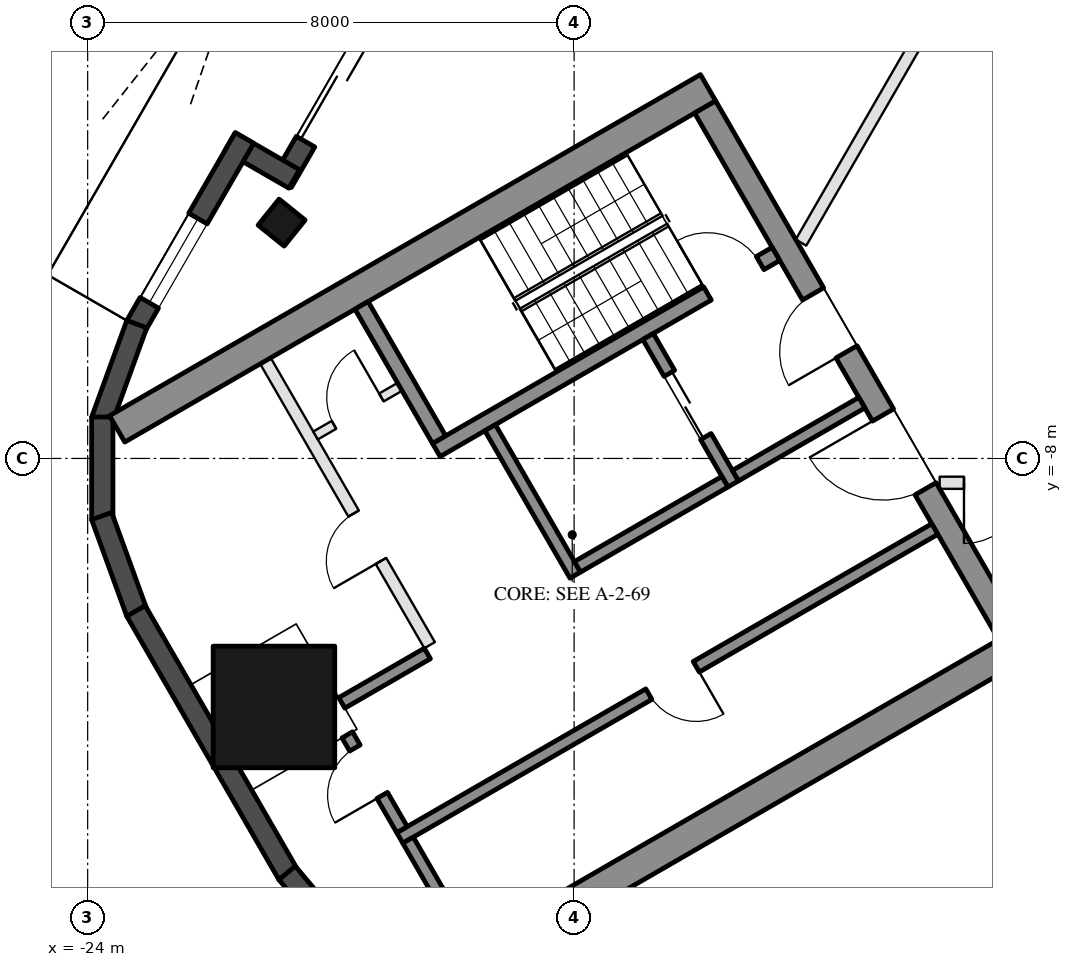
"""IFC4 building model, lengths in metres.
Left out: names, types, materials, properties, quantities, classifications, styles, units other than length and angle.
Written with IfcOpenShell. Run it as: python <this file> out.ifc"""

import sys

from ifc_helpers import new_model, si_unit, direction, frame, frame_2d, origin, origin_2d, place, context, subcontext, project, spatial, rectangle, hollow_rectangle, extrude, boolean, halfspace, element, fill, save


model = new_model("IFC4")
c1 = context("Model", 3, precision=1e-05, world=origin(), true_north=direction((0.0, 1.0)))
c2 = subcontext(c1, "Body", "Model", "MODEL_VIEW")
j1 = project(units=[si_unit("LENGTHUNIT", "METRE"), si_unit("PLANEANGLEUNIT", "RADIAN")], contexts=[c1])
p1 = place(None, origin())
s1 = spatial("IfcSite", under=j1, at=p1, CompositionType="ELEMENT")
p2 = place(p1, origin())
s2 = spatial("IfcBuilding", under=s1, at=p2, CompositionType="ELEMENT")
p3 = place(p2, frame((0.0, 0.0, 298.5)))
s3 = spatial("IfcBuildingStorey", under=s2, at=p3, CompositionType="ELEMENT", Elevation=298.5)
p4 = place(p3, frame((-20.81, -4.121, 0.0), z_axis=(0.190735837279, 0.02958801006, 0.981195388309), x_axis=(-0.488489055842, -0.864137452388, 0.121016138189)))
e1 = element("IfcColumn", 1, at=p4, inside=s3, PredefinedType="COLUMN", context=c2, shape_type="SweptSolid", body=[
    boolean("DIFFERENCE", boolean("DIFFERENCE", extrude(hollow_rectangle(XDim=0.55, YDim=0.55, WallThickness=0.025, at=origin_2d()), origin(), (0.0, 0.0, 1.0), 3.771), halfspace(frame((0.0, 0.0, 0.04), z_axis=(0.0, 0.0, 1.0), x_axis=(1.0, 0.0, 0.0)), True)), halfspace(frame((0.0, 0.0, 3.731), z_axis=(0.0, 0.0, 1.0), x_axis=(1.0, 0.0, 0.0)), False)),
])
p5 = place(p3, frame((-20.936, -12.087, 0.0), z_axis=(0.190408197016, 0.109880592395, 0.975536249416), x_axis=(-0.499868084483, 0.866101551773, 1.1510724e-05)))
e2 = element("IfcColumn", 2, at=p5, inside=s3, PredefinedType="COLUMN", context=c2, shape_type="SweptSolid", body=[
    boolean("DIFFERENCE", boolean("DIFFERENCE", extrude(hollow_rectangle(XDim=2.0, YDim=2.0, WallThickness=0.05, at=origin_2d()), origin(), (0.0, 0.0, 1.0), 3.793), halfspace(frame((0.0, 0.0, 0.113), z_axis=(0.0, 0.0, 1.0), x_axis=(1.0, 0.0, 0.0)), True)), halfspace(frame((0.0, 0.0, 3.679), z_axis=(0.0, 0.0, 1.0), x_axis=(1.0, 0.0, 0.0)), False)),
])
p6 = place(p3, frame((-17.888, 1.59, 0.0), z_axis=(0.0, 0.0, 1.0), x_axis=(-0.499987198161, -0.866032794804, 0.0)))
e3 = element("IfcWall", 3, at=p6, inside=s3, PredefinedType="SOLIDWALL", context=c2, shape_type="SweptSolid", body=[
    extrude(rectangle(XDim=5.827, YDim=0.35, at=frame_2d((2.914, 0.0))), origin(), (0.0, 0.0, 1.0), 3.55),
])
p7 = place(p6, frame((2.657, 0.0, 0.0)))
e4 = element("IfcOpeningElement", 4, at=p7, cuts=e3, PredefinedType="OPENING", context=c2, shape_type="SweptSolid", body=[
    extrude(rectangle(XDim=2.4, YDim=2.4, at=frame_2d((1.2, 1.2))), frame((0.0, 0.185, 0.0), z_axis=(0.0, -1.0, 0.0), x_axis=(1.0, 0.0, 0.0)), (0.0, 0.0, 1.0), 0.37),
])
p8 = place(p6, frame((0.77, 0.0, 0.3)))
e5 = element("IfcOpeningElement", 5, at=p8, cuts=e3, PredefinedType="OPENING", context=c2, shape_type="SweptSolid", body=[
    extrude(rectangle(XDim=1.5, YDim=2.65, at=frame_2d((0.75, 1.325))), frame((0.0, 0.185, 0.0), z_axis=(0.0, -1.0, 0.0), x_axis=(1.0, 0.0, 0.0)), (0.0, 0.0, 1.0), 0.37),
])
p9 = place(p3, frame((-20.604, -3.403, 0.0), z_axis=(0.0, 0.0, 1.0), x_axis=(-0.866092288191, 0.499884134912, 0.0)))
e6 = element("IfcWall", 6, at=p9, inside=s3, PredefinedType="SOLIDWALL", context=c2, shape_type="SweptSolid", body=[
    extrude(rectangle(XDim=1.22, YDim=0.35, at=frame_2d((0.61, 0.0))), origin(), (0.0, 0.0, 1.0), 3.55),
])
p10 = place(p3, frame((-21.421, -2.729, 0.0), z_axis=(0.0, 0.0, 1.0), x_axis=(-0.500040399856, -0.86600207766, 0.0)))
e7 = element("IfcWall", 7, at=p10, inside=s3, PredefinedType="SOLIDWALL", context=c2, shape_type="SweptSolid", body=[
    extrude(rectangle(XDim=3.567, YDim=0.35, at=frame_2d((1.784, 0.0))), origin(), (0.0, 0.0, 1.0), 3.55),
])
p11 = place(p10, frame((1.53, 0.0, 0.3)))
e8 = element("IfcOpeningElement", 8, at=p11, cuts=e7, PredefinedType="OPENING", context=c2, shape_type="SweptSolid", body=[
    extrude(rectangle(XDim=1.6, YDim=2.65, at=frame_2d((0.8, 1.325))), frame((0.0, 0.185, 0.0), z_axis=(0.0, -1.0, 0.0), x_axis=(1.0, 0.0, 0.0)), (0.0, 0.0, 1.0), 0.37),
])
for number, where, z_axis, x_axis in (
    (9, (-23.192, -5.791, 0.0), (0.0, 0.0, 1.0), (-0.342, -0.94, 0.0)),
    (10, (-23.759, -7.319, 0.0), (0.0, 0.0, 1.0), (0.0, -1.0, 0.0)),
    (11, (-23.77, -8.948, 0.0), (0.0, 0.0, 1.0), (0.342, -0.94, 0.0)),
):
    element("IfcWall", number, at=place(p3, frame(where, z_axis=z_axis, x_axis=x_axis)), inside=s3, PredefinedType="SOLIDWALL", context=c2, shape_type="SweptSolid", body=[
        extrude(rectangle(XDim=1.689, YDim=0.35, at=frame_2d((0.845, 0.0))), origin(), (0.0, 0.0, 1.0), 3.55),
    ])
p12 = place(p3, frame((-23.205, -10.508, 0.0), z_axis=(0.0, 0.0, 1.0), x_axis=(0.500016662025, -0.866015783746, 0.0)))
e12 = element("IfcWall", 12, at=p12, inside=s3, PredefinedType="SOLIDWALL", context=c2, shape_type="SweptSolid", body=[
    extrude(rectangle(XDim=5.004, YDim=0.35, at=frame_2d((2.502, 0.0))), origin(), (0.0, 0.0, 1.0), 3.55),
])
p13 = place(p3, frame((-20.72, -14.817, 0.0), z_axis=(0.0, 0.0, 1.0), x_axis=(0.642697100627, -0.766120380127, 0.0)))
e13 = element("IfcWall", 13, at=p13, inside=s3, PredefinedType="SOLIDWALL", context=c2, shape_type="SweptSolid", body=[
    extrude(rectangle(XDim=1.689, YDim=0.35, at=frame_2d((0.845, 0.0))), origin(), (0.0, 0.0, 1.0), 3.55),
])
for number, where, z_axis, x_axis in (
    (14, (-13.797, -1.903, 0.0), (0.0, 0.0, 1.0), (-0.866, -0.5, 0.0)),
    (15, (-8.547, -10.997, 0.0), (0.0, 0.0, 1.0), (-0.866, -0.5, 0.0)),
):
    element("IfcWall", number, at=place(p3, frame(where, z_axis=z_axis, x_axis=x_axis)), inside=s3, PredefinedType="SHEAR", context=c2, shape_type="SweptSolid", body=[
        extrude(rectangle(XDim=11.222, YDim=0.5, at=frame_2d((5.611, 0.0))), origin(), (0.0, 0.0, 1.0), 3.5),
    ])
p14 = place(p3, frame((-13.845, -2.22, 0.0), z_axis=(0.0, 0.0, 1.0), x_axis=(0.500004234368, -0.866022959057, 0.0)))
e16 = element("IfcWall", 16, at=p14, inside=s3, PredefinedType="SHEAR", context=c2, shape_type="SweptSolid", body=[
    extrude(rectangle(XDim=10.0, YDim=0.4, at=frame_2d((5.0, 0.0))), origin(), (0.0, 0.0, 1.0), 3.5),
])
p15 = place(p14, frame((3.55, 0.0, 0.0)))
e17 = element("IfcOpeningElement", 17, at=p15, cuts=e16, PredefinedType="OPENING", context=c2, shape_type="SweptSolid", body=[
    extrude(rectangle(XDim=1.1, YDim=2.1, at=frame_2d((0.55, 1.05))), frame((0.0, 0.21, 0.0), z_axis=(0.0, -1.0, 0.0), x_axis=(1.0, 0.0, 0.0)), (0.0, 0.0, 1.0), 0.42),
])
p16 = place(p14, frame((5.85, 0.0, 0.0)))
e18 = element("IfcOpeningElement", 18, at=p16, cuts=e16, PredefinedType="OPENING", context=c2, shape_type="SweptSolid", body=[
    extrude(rectangle(XDim=1.4, YDim=2.1, at=frame_2d((0.7, 1.05))), frame((0.0, 0.21, 0.0), z_axis=(0.0, -1.0, 0.0), x_axis=(1.0, 0.0, 0.0)), (0.0, 0.0, 1.0), 0.42),
])
p17 = place(p3, frame((-12.681, -4.636, 0.0), z_axis=(0.0, 0.0, 1.0), x_axis=(-0.866021702275, -0.500006411147, 0.0)))
e19 = element("IfcWall", 19, at=p17, inside=s3, PredefinedType="SHEAR", context=c2, shape_type="SweptSolid", body=[
    extrude(rectangle(XDim=6.45, YDim=0.25, at=frame_2d((3.225, 0.0))), origin(), (0.0, 0.0, 1.0), 3.5),
])
p18 = place(p17, frame((0.3, 0.0, 0.0)))
e20 = element("IfcOpeningElement", 20, at=p18, cuts=e19, PredefinedType="OPENING", context=c2, shape_type="SweptSolid", body=[
    extrude(rectangle(XDim=1.0, YDim=2.1, at=frame_2d((0.5, 1.05))), frame((0.0, 0.135, 0.0), z_axis=(0.0, -1.0, 0.0), x_axis=(1.0, 0.0, 0.0)), (0.0, 0.0, 1.0), 0.27),
])
p19 = place(p3, frame((-19.496, -5.482, 0.0), z_axis=(0.0, 0.0, 1.0), x_axis=(0.499990435942, -0.866030925526, 0.0)))
e21 = element("IfcWall", 21, at=p19, inside=s3, PredefinedType="SHEAR", context=c2, shape_type="SweptSolid", body=[
    extrude(rectangle(XDim=2.55, YDim=0.25, at=frame_2d((1.275, 0.0))), origin(), (0.0, 0.0, 1.0), 3.5),
])
p20 = place(p3, frame((-17.381, -7.495, 0.0), z_axis=(0.0, 0.0, 1.0), x_axis=(0.500011755427, -0.866018616679, 0.0)))
e22 = element("IfcWall", 22, at=p20, inside=s3, PredefinedType="SHEAR", context=c2, shape_type="SweptSolid", body=[
    extrude(rectangle(XDim=2.8, YDim=0.2, at=frame_2d((1.4, 0.0))), origin(), (0.0, 0.0, 1.0), 3.5),
])
p21 = place(p3, frame((-14.783, -5.995, 0.0), z_axis=(0.0, 0.0, 1.0), x_axis=(0.49994636267, -0.866056369097, 0.0)))
e23 = element("IfcWall", 23, at=p21, inside=s3, PredefinedType="SHEAR", context=c2, shape_type="SweptSolid", body=[
    extrude(rectangle(XDim=2.8, YDim=0.2, at=frame_2d((1.4, 0.0))), origin(), (0.0, 0.0, 1.0), 3.5),
])
p22 = place(p21, frame((0.7, 0.0, 0.0)))
e24 = element("IfcOpeningElement", 24, at=p22, cuts=e23, PredefinedType="OPENING", context=c2, shape_type="SweptSolid", body=[
    extrude(rectangle(XDim=1.2, YDim=2.1, at=frame_2d((0.6, 1.05))), frame((0.0, 0.11, 0.0), z_axis=(0.0, -1.0, 0.0), x_axis=(1.0, 0.0, 0.0)), (0.0, 0.0, 1.0), 0.22),
])
p23 = place(p3, frame((-13.52, -8.383, 0.0), z_axis=(0.0, 0.0, 1.0), x_axis=(-0.866034573852, -0.49998411664, 0.0)))
e25 = element("IfcWall", 25, at=p23, inside=s3, PredefinedType="SHEAR", context=c2, shape_type="SweptSolid", body=[
    extrude(rectangle(XDim=2.8, YDim=0.2, at=frame_2d((1.4, 0.0))), origin(), (0.0, 0.0, 1.0), 3.5),
])
p24 = place(p3, frame((-11.268, -7.083, 0.0), z_axis=(0.0, 0.0, 1.0), x_axis=(-0.866050077142, -0.499957262057, 0.0)))
e26 = element("IfcWall", 26, at=p24, inside=s3, PredefinedType="SHEAR", context=c2, shape_type="SweptSolid", body=[
    extrude(rectangle(XDim=2.4, YDim=0.2, at=frame_2d((1.2, 0.0))), origin(), (0.0, 0.0, 1.0), 3.5),
])
p25 = place(p3, frame((-10.068, -9.162, 0.0), z_axis=(0.0, 0.0, 1.0), x_axis=(-0.866032725843, -0.499987317609, 0.0)))
e27 = element("IfcWall", 27, at=p25, inside=s3, PredefinedType="SHEAR", context=c2, shape_type="SweptSolid", body=[
    extrude(rectangle(XDim=10.16, YDim=0.2, at=frame_2d((5.08, 0.0))), origin(), (0.0, 0.0, 1.0), 3.5),
])
p26 = place(p25, frame((4.53, 0.0, 0.0)))
e28 = element("IfcOpeningElement", 28, at=p26, cuts=e27, PredefinedType="OPENING", context=c2, shape_type="SweptSolid", body=[
    extrude(rectangle(XDim=0.9, YDim=2.1, at=frame_2d((0.45, 1.05))), frame((0.0, 0.11, 0.0), z_axis=(0.0, -1.0, 0.0), x_axis=(1.0, 0.0, 0.0)), (0.0, 0.0, 1.0), 0.22),
])
p27 = place(p3, frame((-19.73, -12.546, 0.0), z_axis=(0.0, 0.0, 1.0), x_axis=(0.500004188491, -0.866022985545, 0.0)))
e29 = element("IfcWall", 29, at=p27, inside=s3, PredefinedType="SHEAR", context=c2, shape_type="SweptSolid", body=[
    extrude(rectangle(XDim=1.8, YDim=0.2, at=frame_2d((0.9, 0.0))), origin(), (0.0, 0.0, 1.0), 3.5),
])
p28 = place(p27, frame((0.25, 0.0, 0.0)))
e30 = element("IfcOpeningElement", 30, at=p28, cuts=e29, PredefinedType="OPENING", context=c2, shape_type="SweptSolid", body=[
    extrude(rectangle(XDim=0.9, YDim=2.1, at=frame_2d((0.45, 1.05))), frame((0.0, 0.11, 0.0), z_axis=(0.0, -1.0, 0.0), x_axis=(1.0, 0.0, 0.0)), (0.0, 0.0, 1.0), 0.22),
])
p29 = place(p3, frame((-18.413, -11.208, 0.0), z_axis=(0.0, 0.0, 1.0), x_axis=(-0.866053003207, -0.499952193351, 0.0)))
e31 = element("IfcWall", 31, at=p29, inside=s3, PredefinedType="SHEAR", context=c2, shape_type="SweptSolid", body=[
    extrude(rectangle(XDim=1.625, YDim=0.2, at=frame_2d((0.812, 0.0))), origin(), (0.0, 0.0, 1.0), 3.5),
])
p30 = place(p3, frame((-18.73, -14.278, 0.0), z_axis=(0.0, 0.0, 1.0), x_axis=(0.50002537861, -0.866010750942, 0.0)))
e32 = element("IfcWall", 32, at=p30, inside=s3, PredefinedType="SHEAR", context=c2, shape_type="SweptSolid", body=[
    extrude(rectangle(XDim=2.0, YDim=0.2, at=frame_2d((1.0, 0.0))), origin(), (0.0, 0.0, 1.0), 3.5),
])
p31 = place(p3, frame((-21.076, -6.395, 0.0), z_axis=(0.0, 0.0, 1.0), x_axis=(0.50001468107, -0.866016927499, 0.0)))
e33 = element("IfcWall", 33, at=p31, inside=s3, PredefinedType="PARTITIONING", context=c2, shape_type="SweptSolid", body=[
    extrude(rectangle(XDim=5.4, YDim=0.2, at=frame_2d((2.7, 0.0))), origin(), (0.0, 0.0, 1.0), 3.5),
])
p32 = place(p31, frame((2.9, 0.0, 0.0)))
e34 = element("IfcOpeningElement", 34, at=p32, cuts=e33, PredefinedType="OPENING", context=c2, shape_type="SweptSolid", body=[
    extrude(rectangle(XDim=0.9, YDim=2.1, at=frame_2d((0.45, 1.05))), frame((0.0, 0.11, 0.0), z_axis=(0.0, -1.0, 0.0), x_axis=(1.0, 0.0, 0.0)), (0.0, 0.0, 1.0), 0.22),
])
p33 = place(p3, frame((-18.866, -6.822, 0.0), z_axis=(0.0, 0.0, 1.0), x_axis=(-0.866028054938, -0.499995408039, 0.0)))
e35 = element("IfcWall", 35, at=p33, inside=s3, PredefinedType="PARTITIONING", context=c2, shape_type="SweptSolid", body=[
    extrude(rectangle(XDim=1.6, YDim=0.15, at=frame_2d((0.8, 0.0))), origin(), (0.0, 0.0, 1.0), 3.5),
])
p34 = place(p33, frame((0.35, 0.0, 0.0)))
e36 = element("IfcOpeningElement", 36, at=p34, cuts=e35, PredefinedType="OPENING", context=c2, shape_type="SweptSolid", body=[
    extrude(rectangle(XDim=0.9, YDim=2.1, at=frame_2d((0.45, 1.05))), frame((0.0, 0.085, 0.0), z_axis=(0.0, -1.0, 0.0), x_axis=(1.0, 0.0, 0.0)), (0.0, 0.0, 1.0), 0.17),
])
p35 = place(p3, frame((-6.181, -8.4, 0.0), z_axis=(0.0, 0.0, 1.0), x_axis=(-1.0, 0.0, 0.0)))
e37 = element("IfcWall", 37, at=p35, inside=s3, PredefinedType="PARTITIONING", context=c2, shape_type="SweptSolid", body=[
    extrude(rectangle(XDim=3.807, YDim=0.2, at=frame_2d((1.904, 0.0))), origin(), (0.0, 0.0, 1.0), 3.1),
])
p36 = place(p35, frame((2.407, 0.0, 0.0)))
e38 = element("IfcOpeningElement", 38, at=p36, cuts=e37, PredefinedType="OPENING", context=c2, shape_type="SweptSolid", body=[
    extrude(rectangle(XDim=1.0, YDim=2.1, at=frame_2d((0.5, 1.05))), frame((0.0, 0.11, 0.0), z_axis=(0.0, -1.0, 0.0), x_axis=(1.0, 0.0, 0.0)), (0.0, 0.0, 1.0), 0.22),
])
p37 = place(p3, frame((-12.269, -4.45, 0.0), z_axis=(0.0, 0.0, 1.0), x_axis=(0.500016364551, 0.8660159555, 0.0)))
e39 = element("IfcWall", 39, at=p37, inside=s3, PredefinedType="PARTITIONING", context=c2, shape_type="SweptSolid", body=[
    extrude(rectangle(XDim=10.091, YDim=0.2, at=frame_2d((5.045, 0.0))), origin(), (0.0, 0.0, 1.0), 3.1),
])
p38 = place(p37, frame((6.638, 0.0, 0.0)))
e40 = element("IfcOpeningElement", 40, at=p38, cuts=e39, PredefinedType="OPENING", context=c2, shape_type="SweptSolid", body=[
    extrude(rectangle(XDim=1.0, YDim=2.1, at=frame_2d((0.5, 1.05))), frame((0.0, 0.11, 0.0), z_axis=(0.0, -1.0, 0.0), x_axis=(1.0, 0.0, 0.0)), (0.0, 0.0, 1.0), 0.22),
])
p39 = place(p7, frame((2.4, 0.0, 0.0), z_axis=(0.0, 0.0, 1.0), x_axis=(-1.0, 0.0, 0.0)))
e41 = element("IfcDoor", 41, at=p39, inside=s3, OperationType="SLIDING_TO_LEFT", PredefinedType="DOOR", context=c2, shape_type="SweptSolid", body=[
    extrude(rectangle(XDim=2.4, YDim=2.4, at=frame_2d((1.2, 1.2))), frame((0.0, 0.025, 0.0), z_axis=(0.0, -1.0, 0.0), x_axis=(1.0, 0.0, 0.0)), (0.0, 0.0, 1.0), 0.05),
])
fill(e4, e41)
p40 = place(p11, origin())
e42 = element("IfcWindow", 42, at=p40, inside=s3, PartitioningType="SINGLE_PANEL", PredefinedType="WINDOW", context=c2, shape_type="SweptSolid", body=[
    extrude(rectangle(XDim=1.6, YDim=2.65, at=frame_2d((0.8, 1.325))), frame((0.0, 0.03, 0.0), z_axis=(0.0, -1.0, 0.0), x_axis=(1.0, 0.0, 0.0)), (0.0, 0.0, 1.0), 0.06),
])
fill(e8, e42)
p41 = place(p22, origin())
e43 = element("IfcDoor", 43, at=p41, inside=s3, OperationType="DOUBLE_DOOR_SLIDING", PredefinedType="DOOR", context=c2, shape_type="SweptSolid", body=[
    extrude(rectangle(XDim=1.2, YDim=2.1, at=frame_2d((0.6, 1.05))), frame((0.0, 0.025, 0.0), z_axis=(0.0, -1.0, 0.0), x_axis=(1.0, 0.0, 0.0)), (0.0, 0.0, 1.0), 0.05),
])
fill(e24, e43)
p42 = place(p34, frame((0.9, 0.0, 0.0), z_axis=(0.0, 0.0, 1.0), x_axis=(-1.0, 0.0, 0.0)))
e44 = element("IfcDoor", 44, at=p42, inside=s3, OperationType="SINGLE_SWING_RIGHT", PredefinedType="DOOR", context=c2, shape_type="SweptSolid", body=[
    extrude(rectangle(XDim=0.9, YDim=2.1, at=frame_2d((0.45, 1.05))), frame((0.0, 0.025, 0.0), z_axis=(0.0, -1.0, 0.0), x_axis=(1.0, 0.0, 0.0)), (0.0, 0.0, 1.0), 0.05),
])
fill(e36, e44)
p43 = place(p26, origin())
e45 = element("IfcDoor", 45, at=p43, inside=s3, OperationType="SINGLE_SWING_LEFT", PredefinedType="DOOR", context=c2, shape_type="SweptSolid", body=[
    extrude(rectangle(XDim=0.9, YDim=2.1, at=frame_2d((0.45, 1.05))), frame((0.0, 0.025, 0.0), z_axis=(0.0, -1.0, 0.0), x_axis=(1.0, 0.0, 0.0)), (0.0, 0.0, 1.0), 0.05),
])
fill(e28, e45)
p44 = place(p28, frame((0.9, 0.0, 0.0), z_axis=(0.0, 0.0, 1.0), x_axis=(-1.0, 0.0, 0.0)))
e46 = element("IfcDoor", 46, at=p44, inside=s3, OperationType="SINGLE_SWING_LEFT", PredefinedType="DOOR", context=c2, shape_type="SweptSolid", body=[
    extrude(rectangle(XDim=0.9, YDim=2.1, at=frame_2d((0.45, 1.05))), frame((0.0, 0.025, 0.0), z_axis=(0.0, -1.0, 0.0), x_axis=(1.0, 0.0, 0.0)), (0.0, 0.0, 1.0), 0.05),
])
fill(e30, e46)
p45 = place(p32, frame((0.9, 0.0, 0.0), z_axis=(0.0, 0.0, 1.0), x_axis=(-1.0, 0.0, 0.0)))
e47 = element("IfcDoor", 47, at=p45, inside=s3, OperationType="SINGLE_SWING_LEFT", PredefinedType="DOOR", context=c2, shape_type="SweptSolid", body=[
    extrude(rectangle(XDim=0.9, YDim=2.1, at=frame_2d((0.45, 1.05))), frame((0.0, 0.025, 0.0), z_axis=(0.0, -1.0, 0.0), x_axis=(1.0, 0.0, 0.0)), (0.0, 0.0, 1.0), 0.05),
])
fill(e34, e47)
p46 = place(p15, frame((1.1, 0.0, 0.0), z_axis=(0.0, 0.0, 1.0), x_axis=(-1.0, 0.0, 0.0)))
e48 = element("IfcDoor", 48, at=p46, inside=s3, OperationType="SINGLE_SWING_LEFT", PredefinedType="DOOR", context=c2, shape_type="SweptSolid", body=[
    extrude(rectangle(XDim=1.1, YDim=2.1, at=frame_2d((0.55, 1.05))), frame((0.0, 0.025, 0.0), z_axis=(0.0, -1.0, 0.0), x_axis=(1.0, 0.0, 0.0)), (0.0, 0.0, 1.0), 0.05),
])
fill(e17, e48)
p47 = place(p16, frame((1.4, 0.0, 0.0), z_axis=(0.0, 0.0, 1.0), x_axis=(-1.0, 0.0, 0.0)))
e49 = element("IfcDoor", 49, at=p47, inside=s3, OperationType="DOUBLE_DOOR_SINGLE_SWING", PredefinedType="DOOR", context=c2, shape_type="SweptSolid", body=[
    extrude(rectangle(XDim=1.4, YDim=2.1, at=frame_2d((0.7, 1.05))), frame((0.0, 0.025, 0.0), z_axis=(0.0, -1.0, 0.0), x_axis=(1.0, 0.0, 0.0)), (0.0, 0.0, 1.0), 0.05),
])
fill(e18, e49)
p48 = place(p18, frame((1.0, 0.0, 0.0), z_axis=(0.0, 0.0, 1.0), x_axis=(-1.0, 0.0, 0.0)))
e50 = element("IfcDoor", 50, at=p48, inside=s3, OperationType="SINGLE_SWING_LEFT", PredefinedType="DOOR", context=c2, shape_type="SweptSolid", body=[
    extrude(rectangle(XDim=1.0, YDim=2.1, at=frame_2d((0.5, 1.05))), frame((0.0, 0.025, 0.0), z_axis=(0.0, -1.0, 0.0), x_axis=(1.0, 0.0, 0.0)), (0.0, 0.0, 1.0), 0.05),
])
fill(e20, e50)
p49 = place(p36, origin())
e51 = element("IfcDoor", 51, at=p49, inside=s3, OperationType="SINGLE_SWING_RIGHT", PredefinedType="DOOR", context=c2, shape_type="SweptSolid", body=[
    extrude(rectangle(XDim=1.0, YDim=2.1, at=frame_2d((0.5, 1.05))), frame((0.0, 0.025, 0.0), z_axis=(0.0, -1.0, 0.0), x_axis=(1.0, 0.0, 0.0)), (0.0, 0.0, 1.0), 0.05),
])
fill(e38, e51)
save(model, sys.argv[1])
